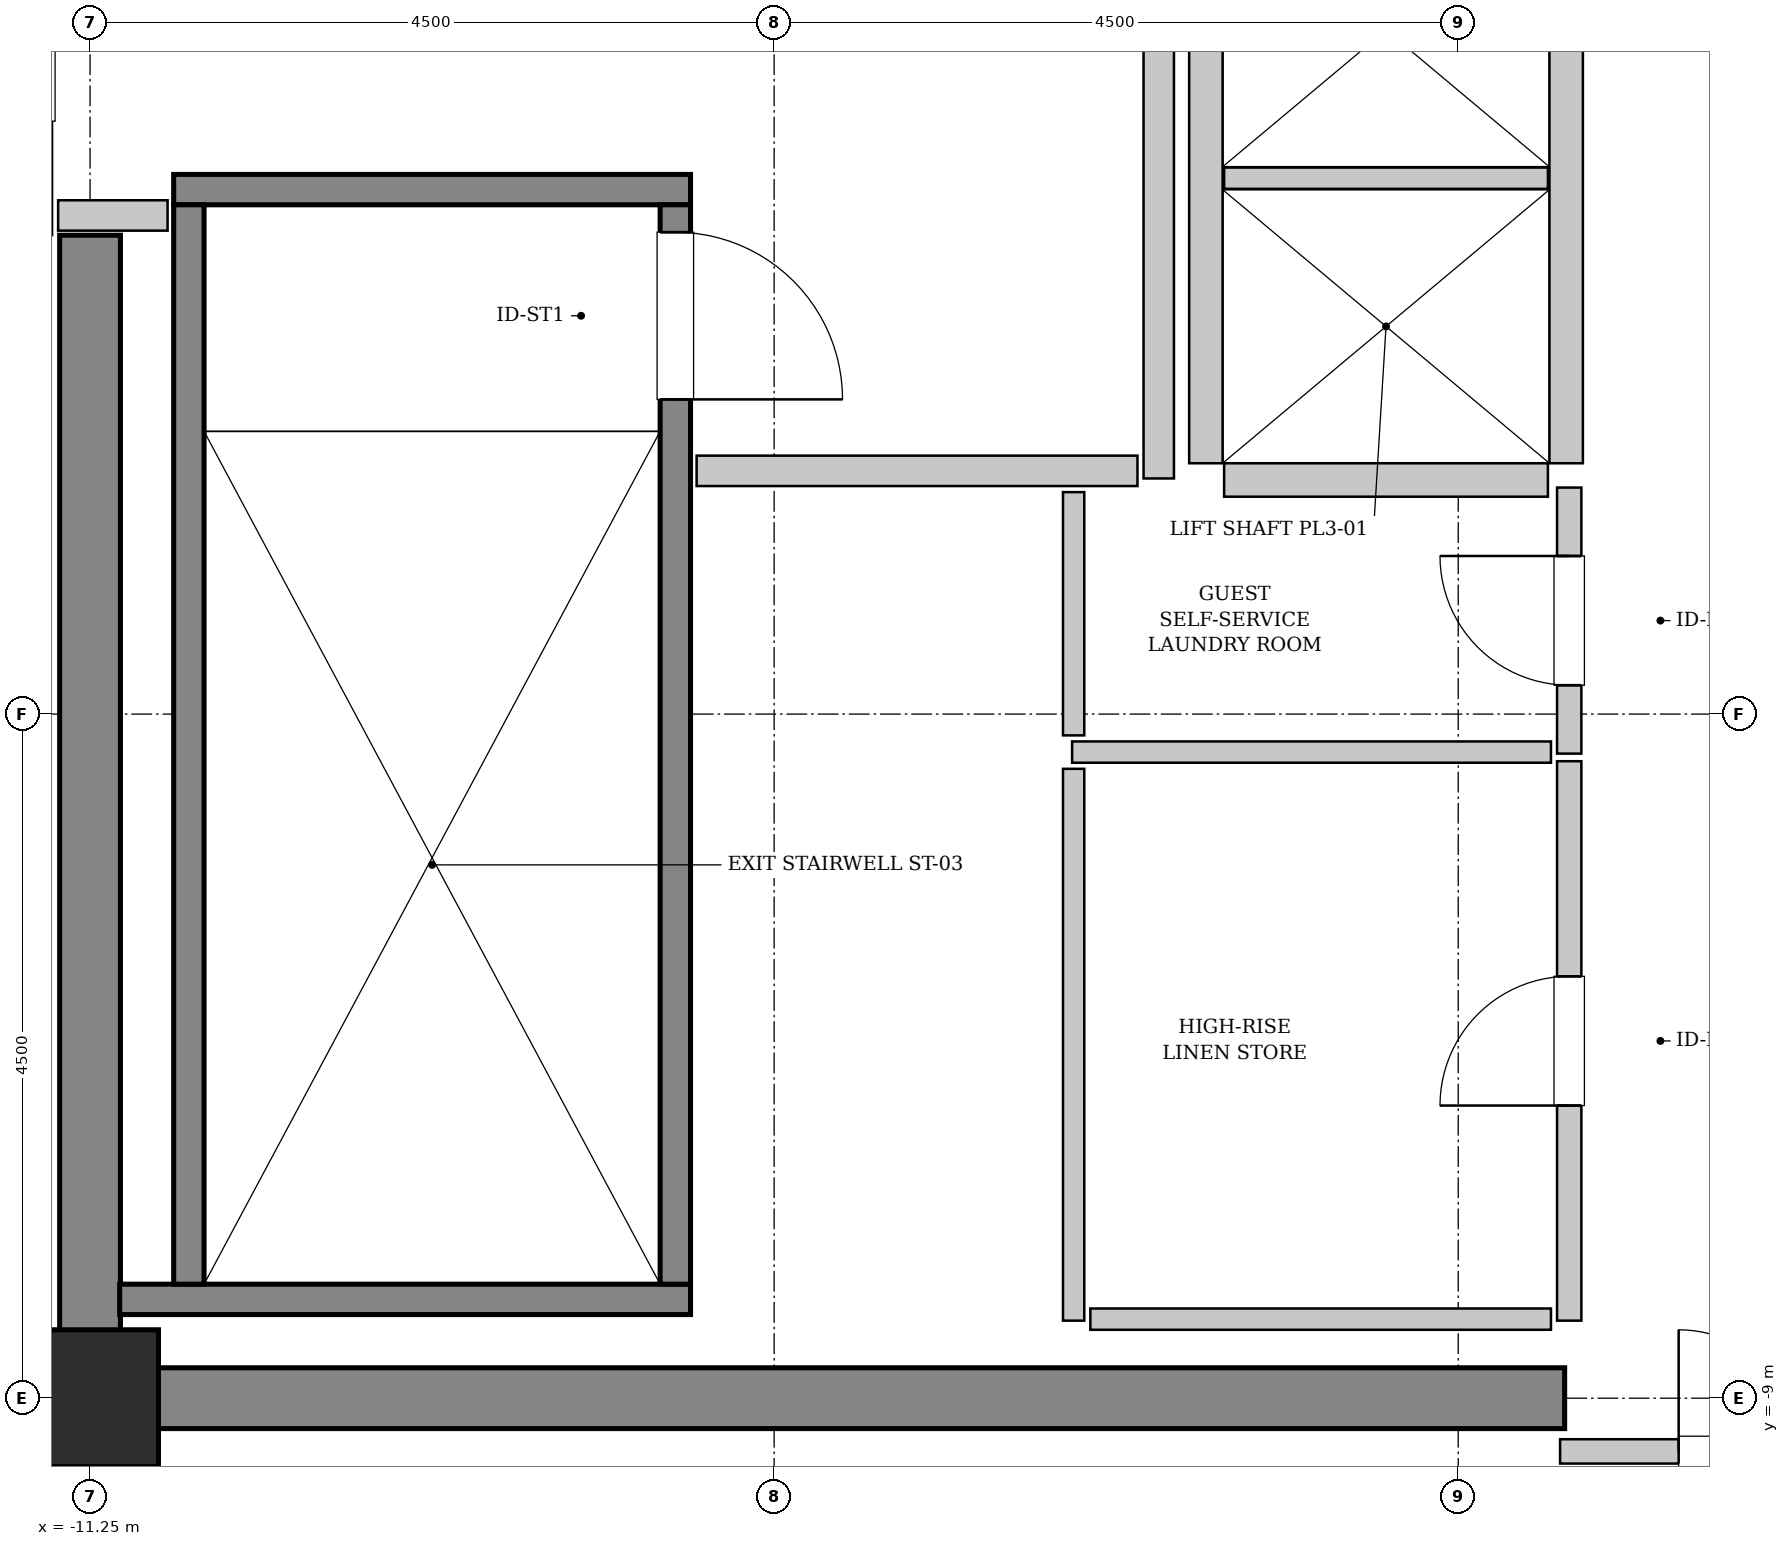
"""IFC4 building model, lengths in metres.
Left out: names, types, materials, properties, quantities, classifications, styles, units other than length and angle.
Written with IfcOpenShell. Run it as: python <this file> out.ifc"""

import sys

from ifc_helpers import new_model, si_unit, direction, frame, frame_2d, origin, origin_2d, place, context, subcontext, project, spatial, rectangle, extrude, source, transform, mapped, element, fill, save


model = new_model("IFC4")
c1 = context("Model", 3, precision=1e-05, world=origin(), true_north=direction((0.0, 1.0)))
c2 = subcontext(c1, "Body", "Model", "MODEL_VIEW")
j1 = project(units=[si_unit("LENGTHUNIT", "METRE"), si_unit("PLANEANGLEUNIT", "RADIAN")], contexts=[c1])
p1 = place(None, origin())
s1 = spatial("IfcSite", under=j1, at=p1, CompositionType="ELEMENT")
p2 = place(p1, origin())
s2 = spatial("IfcBuilding", under=s1, at=p2, CompositionType="ELEMENT")
p3 = place(p2, frame((0.0, 0.0, 349.0)))
s3 = spatial("IfcBuildingStorey", under=s2, at=p3, CompositionType="ELEMENT", Elevation=349.0)
m1 = source(origin(), c2, "Body", "SweptSolid", [
    extrude(rectangle(XDim=9.9, YDim=0.4, at=frame_2d((4.95, 0.0))), origin(), (0.0, 0.0, 1.0), 4.8),
])
p4 = place(p3, frame((-11.45, -9.0, 0.0), z_axis=(0.0, 0.0, 1.0), x_axis=(1.0, 0.0, 0.0)))
e1 = element("IfcWall", 1, at=p4, inside=s3, PredefinedType="SHEAR", context=c2, shape_type="MappedRepresentation", body=[
    mapped(m1, transform((0.0, 0.0, 0.0), x_axis=(1.0, 0.0, 0.0), y_axis=(0.0, 1.0, 0.0), z_axis=(0.0, 0.0, 1.0), scale=1.0)),
])
m2 = source(origin(), c2, "Body", "SweptSolid", [
    extrude(rectangle(XDim=7.45, YDim=0.4, at=frame_2d((3.725, 0.0))), origin(), (0.0, 0.0, 1.0), 4.8),
])
p5 = place(p3, frame((-11.25, -8.8, 0.0), z_axis=(0.0, 0.0, 1.0), x_axis=(0.0, 1.0, 0.0)))
e2 = element("IfcWall", 2, at=p5, inside=s3, PredefinedType="SHEAR", context=c2, shape_type="MappedRepresentation", body=[
    mapped(m2, transform((0.0, 0.0, 0.0), x_axis=(1.0, 0.0, 0.0), y_axis=(0.0, 1.0, 0.0), z_axis=(0.0, 0.0, 1.0), scale=1.0)),
])
m3 = source(origin(), c2, "Body", "SweptSolid", [
    extrude(rectangle(XDim=0.9, YDim=0.9, at=origin_2d()), origin(), (0.0, 0.0, 1.0), 4.8),
])
p6 = place(p3, frame((-11.25, -9.0, 0.0), z_axis=(0.0, 0.0, 1.0), x_axis=(1.0, 0.0, 0.0)))
e3 = element("IfcColumn", 3, at=p6, inside=s3, PredefinedType="COLUMN", context=c2, shape_type="MappedRepresentation", body=[
    mapped(m3, transform((0.0, 0.0, 0.0), x_axis=(1.0, 0.0, 0.0), y_axis=(0.0, 1.0, 0.0), z_axis=(0.0, 0.0, 1.0), scale=1.0)),
])
m4 = source(origin(), c2, "Body", "SweptSolid", [
    extrude(rectangle(XDim=3.4, YDim=0.2, at=frame_2d((1.7, 0.0))), origin(), (0.0, 0.0, 1.0), 4.8),
])
p7 = place(p3, frame((-10.7, -1.05, 0.0), z_axis=(0.0, 0.0, 1.0), x_axis=(1.0, 0.0, 0.0)))
e4 = element("IfcWall", 4, at=p7, inside=s3, PredefinedType="SOLIDWALL", context=c2, shape_type="MappedRepresentation", body=[
    mapped(m4, transform((0.0, 0.0, 0.0), x_axis=(1.0, 0.0, 0.0), y_axis=(0.0, 1.0, 0.0), z_axis=(0.0, 0.0, 1.0), scale=1.0)),
])
m5 = source(origin(), c2, "Body", "SweptSolid", [
    extrude(rectangle(XDim=3.755, YDim=0.2, at=frame_2d((1.877, 0.0))), origin(), (0.0, 0.0, 1.0), 4.8),
])
p8 = place(p3, frame((-11.055, -8.35, 0.0), z_axis=(0.0, 0.0, 1.0), x_axis=(1.0, 0.0, 0.0)))
e5 = element("IfcWall", 5, at=p8, inside=s3, PredefinedType="SOLIDWALL", context=c2, shape_type="MappedRepresentation", body=[
    mapped(m5, transform((0.0, 0.0, 0.0), x_axis=(1.0, 0.0, 0.0), y_axis=(0.0, 1.0, 0.0), z_axis=(0.0, 0.0, 1.0), scale=1.0)),
])
m6 = source(origin(), c2, "Body", "SweptSolid", [
    extrude(rectangle(XDim=7.1, YDim=0.2, at=frame_2d((3.55, 0.0))), origin(), (0.0, 0.0, 1.0), 4.8),
])
p9 = place(p3, frame((-10.6, -1.15, 0.0), z_axis=(0.0, 0.0, 1.0), x_axis=(0.0, -1.0, 0.0)))
e6 = element("IfcWall", 6, at=p9, inside=s3, PredefinedType="SOLIDWALL", context=c2, shape_type="MappedRepresentation", body=[
    mapped(m6, transform((0.0, 0.0, 0.0), x_axis=(1.0, 0.0, 0.0), y_axis=(0.0, 1.0, 0.0), z_axis=(0.0, 0.0, 1.0), scale=1.0)),
])
p10 = place(p3, frame((-7.4, -1.15, 0.0), z_axis=(0.0, 0.0, 1.0), x_axis=(0.0, -1.0, 0.0)))
e7 = element("IfcWall", 7, at=p10, inside=s3, PredefinedType="SOLIDWALL", context=c2, shape_type="MappedRepresentation", body=[
    mapped(m6, transform((0.0, 0.0, 0.0), x_axis=(1.0, 0.0, 0.0), y_axis=(0.0, 1.0, 0.0), z_axis=(0.0, 0.0, 1.0), scale=1.0)),
])
p11 = place(p10, frame((0.18, 0.0, 0.0)))
e8 = element("IfcOpeningElement", 8, at=p11, cuts=e7, PredefinedType="OPENING", context=c2, shape_type="SweptSolid", body=[
    extrude(rectangle(XDim=1.1, YDim=2.15, at=frame_2d((0.55, 1.075))), frame((0.0, 0.11, 0.0), z_axis=(0.0, -1.0, 0.0), x_axis=(1.0, 0.0, 0.0)), (0.0, 0.0, 1.0), 0.22),
])
m7 = source(origin(), c2, "Body", "SweptSolid", [
    extrude(rectangle(XDim=5.7, YDim=0.22, at=frame_2d((2.85, 0.0))), origin(), (0.0, 0.0, 1.0), 4.485),
])
for number, where, z_axis, x_axis in (
    (9, (-1.54, -2.85, 0.0), (0.0, 0.0, 1.0), (0.0, 1.0, 0.0)),
    (10, (-3.91, 2.85, 0.0), (0.0, 0.0, 1.0), (0.0, -1.0, 0.0)),
):
    element("IfcWall", number, at=place(p3, frame(where, z_axis=z_axis, x_axis=x_axis)), inside=s3, PredefinedType="SOLIDWALL", context=c2, shape_type="MappedRepresentation", body=[
        mapped(m7, transform((0.0, 0.0, 0.0), x_axis=(1.0, 0.0, 0.0), y_axis=(0.0, 1.0, 0.0), z_axis=(0.0, 0.0, 1.0), scale=1.0)),
    ])
m8 = source(origin(), c2, "Body", "SweptSolid", [
    extrude(rectangle(XDim=2.13, YDim=0.22, at=frame_2d((1.065, 0.0))), origin(), (0.0, 0.0, 1.0), 4.485),
])
p12 = place(p3, frame((-3.79, -2.96, 0.0), z_axis=(0.0, 0.0, 1.0), x_axis=(1.0, 0.0, 0.0)))
e11 = element("IfcWall", 11, at=p12, inside=s3, PredefinedType="SOLIDWALL", context=c2, shape_type="MappedRepresentation", body=[
    mapped(m8, transform((0.0, 0.0, 0.0), x_axis=(1.0, 0.0, 0.0), y_axis=(0.0, 1.0, 0.0), z_axis=(0.0, 0.0, 1.0), scale=1.0)),
])
m9 = source(origin(), c2, "Body", "SweptSolid", [
    extrude(rectangle(XDim=2.13, YDim=0.14, at=frame_2d((1.065, 0.0))), origin(), (0.0, 0.0, 1.0), 4.485),
])
p13 = place(p3, frame((-3.79, -0.975, 0.0), z_axis=(0.0, 0.0, 1.0), x_axis=(1.0, 0.0, 0.0)))
e12 = element("IfcWall", 12, at=p13, inside=s3, PredefinedType="PARTITIONING", context=c2, shape_type="MappedRepresentation", body=[
    mapped(m9, transform((0.0, 0.0, 0.0), x_axis=(1.0, 0.0, 0.0), y_axis=(0.0, 1.0, 0.0), z_axis=(0.0, 0.0, 1.0), scale=1.0)),
])
m10 = source(origin(), c2, "Body", "SweptSolid", [
    extrude(rectangle(XDim=5.9, YDim=0.2, at=frame_2d((2.95, 0.0))), origin(), (0.0, 0.0, 1.0), 4.485),
])
p14 = place(p3, frame((-4.22, -2.95, 0.0), z_axis=(0.0, 0.0, 1.0), x_axis=(0.0, 1.0, 0.0)))
e13 = element("IfcWall", 13, at=p14, inside=s3, PredefinedType="PARTITIONING", context=c2, shape_type="MappedRepresentation", body=[
    mapped(m10, transform((0.0, 0.0, 0.0), x_axis=(1.0, 0.0, 0.0), y_axis=(0.0, 1.0, 0.0), z_axis=(0.0, 0.0, 1.0), scale=1.0)),
])
m11 = source(origin(), c2, "Body", "SweptSolid", [
    extrude(rectangle(XDim=2.9, YDim=0.2, at=frame_2d((1.45, 0.0))), origin(), (0.0, 0.0, 1.0), 4.485),
])
p15 = place(p3, frame((-7.26, -2.9, 0.0), z_axis=(0.0, 0.0, 1.0), x_axis=(1.0, 0.0, 0.0)))
e14 = element("IfcWall", 14, at=p15, inside=s3, PredefinedType="PARTITIONING", context=c2, shape_type="MappedRepresentation", body=[
    mapped(m11, transform((0.0, 0.0, 0.0), x_axis=(1.0, 0.0, 0.0), y_axis=(0.0, 1.0, 0.0), z_axis=(0.0, 0.0, 1.0), scale=1.0)),
])
m12 = source(origin(), c2, "Body", "SweptSolid", [
    extrude(rectangle(XDim=0.72, YDim=0.2, at=frame_2d((0.36, 0.0))), origin(), (0.0, 0.0, 1.0), 4.485),
])
p16 = place(p3, frame((-11.46, -1.22, 0.0), z_axis=(0.0, 0.0, 1.0), x_axis=(1.0, 0.0, 0.0)))
e15 = element("IfcWall", 15, at=p16, inside=s3, PredefinedType="PARTITIONING", context=c2, shape_type="MappedRepresentation", body=[
    mapped(m12, transform((0.0, 0.0, 0.0), x_axis=(1.0, 0.0, 0.0), y_axis=(0.0, 1.0, 0.0), z_axis=(0.0, 0.0, 1.0), scale=1.0)),
])
m13 = source(origin(), c2, "Body", "SweptSolid", [
    extrude(rectangle(XDim=3.16, YDim=0.16, at=frame_2d((1.58, 0.0))), origin(), (0.0, 0.0, 1.0), 3.575),
])
p17 = place(p3, frame((-1.58, -9.35, 0.0), z_axis=(0.0, 0.0, 1.0), x_axis=(1.0, 0.0, 0.0)))
e16 = element("IfcWall", 16, at=p17, inside=s3, PredefinedType="PARTITIONING", context=c2, shape_type="MappedRepresentation", body=[
    mapped(m13, transform((0.0, 0.0, 0.0), x_axis=(1.0, 0.0, 0.0), y_axis=(0.0, 1.0, 0.0), z_axis=(0.0, 0.0, 1.0), scale=1.0)),
])
p18 = place(p17, frame((0.78, 0.0, 0.0)))
e17 = element("IfcOpeningElement", 17, at=p18, cuts=e16, PredefinedType="OPENING", context=c2, shape_type="SweptSolid", body=[
    extrude(rectangle(XDim=1.6, YDim=2.3, at=frame_2d((0.8, 1.15))), frame((0.0, 0.09, 0.0), z_axis=(0.0, -1.0, 0.0), x_axis=(1.0, 0.0, 0.0)), (0.0, 0.0, 1.0), 0.18),
])
m14 = source(origin(), c2, "Body", "SweptSolid", [
    extrude(rectangle(XDim=1.75, YDim=0.16, at=frame_2d((0.875, 0.0))), origin(), (0.0, 0.0, 1.0), 4.485),
])
p19 = place(p3, frame((-1.52, -4.76, 0.0), z_axis=(0.0, 0.0, 1.0), x_axis=(0.0, 1.0, 0.0)))
e18 = element("IfcWall", 18, at=p19, inside=s3, PredefinedType="PARTITIONING", context=c2, shape_type="MappedRepresentation", body=[
    mapped(m14, transform((0.0, 0.0, 0.0), x_axis=(1.0, 0.0, 0.0), y_axis=(0.0, 1.0, 0.0), z_axis=(0.0, 0.0, 1.0), scale=1.0)),
])
p20 = place(p19, frame((0.45, 0.0, 0.0)))
e19 = element("IfcOpeningElement", 19, at=p20, cuts=e18, PredefinedType="OPENING", context=c2, shape_type="SweptSolid", body=[
    extrude(rectangle(XDim=0.85, YDim=2.1, at=frame_2d((0.425, 1.05))), frame((0.0, 0.09, 0.0), z_axis=(0.0, -1.0, 0.0), x_axis=(1.0, 0.0, 0.0)), (0.0, 0.0, 1.0), 0.18),
])
m15 = source(origin(), c2, "Body", "SweptSolid", [
    extrude(rectangle(XDim=3.15, YDim=0.14, at=frame_2d((1.575, 0.0))), origin(), (0.0, 0.0, 1.0), 4.485),
])
p21 = place(p3, frame((-4.79, -4.75, 0.0), z_axis=(0.0, 0.0, 1.0), x_axis=(1.0, 0.0, 0.0)))
e20 = element("IfcWall", 20, at=p21, inside=s3, PredefinedType="PARTITIONING", context=c2, shape_type="MappedRepresentation", body=[
    mapped(m15, transform((0.0, 0.0, 0.0), x_axis=(1.0, 0.0, 0.0), y_axis=(0.0, 1.0, 0.0), z_axis=(0.0, 0.0, 1.0), scale=1.0)),
])
m16 = source(origin(), c2, "Body", "SweptSolid", [
    extrude(rectangle(XDim=1.6, YDim=0.14, at=frame_2d((0.8, 0.0))), origin(), (0.0, 0.0, 1.0), 4.485),
])
p22 = place(p3, frame((-4.78, -4.64, 0.0), z_axis=(0.0, 0.0, 1.0), x_axis=(0.0, 1.0, 0.0)))
e21 = element("IfcWall", 21, at=p22, inside=s3, PredefinedType="PARTITIONING", context=c2, shape_type="MappedRepresentation", body=[
    mapped(m16, transform((0.0, 0.0, 0.0), x_axis=(1.0, 0.0, 0.0), y_axis=(0.0, 1.0, 0.0), z_axis=(0.0, 0.0, 1.0), scale=1.0)),
])
m17 = source(origin(), c2, "Body", "SweptSolid", [
    extrude(rectangle(XDim=3.68, YDim=0.16, at=frame_2d((1.84, 0.0))), origin(), (0.0, 0.0, 1.0), 4.485),
])
p23 = place(p3, frame((-1.52, -8.49, 0.0), z_axis=(0.0, 0.0, 1.0), x_axis=(0.0, 1.0, 0.0)))
e22 = element("IfcWall", 22, at=p23, inside=s3, PredefinedType="PARTITIONING", context=c2, shape_type="MappedRepresentation", body=[
    mapped(m17, transform((0.0, 0.0, 0.0), x_axis=(1.0, 0.0, 0.0), y_axis=(0.0, 1.0, 0.0), z_axis=(0.0, 0.0, 1.0), scale=1.0)),
])
p24 = place(p23, frame((1.415, 0.0, 0.0)))
e23 = element("IfcOpeningElement", 23, at=p24, cuts=e22, PredefinedType="OPENING", context=c2, shape_type="SweptSolid", body=[
    extrude(rectangle(XDim=0.85, YDim=2.1, at=frame_2d((0.425, 1.05))), frame((0.0, 0.09, 0.0), z_axis=(0.0, -1.0, 0.0), x_axis=(1.0, 0.0, 0.0)), (0.0, 0.0, 1.0), 0.18),
])
m18 = source(origin(), c2, "Body", "SweptSolid", [
    extrude(rectangle(XDim=3.63, YDim=0.14, at=frame_2d((1.815, 0.0))), origin(), (0.0, 0.0, 1.0), 4.485),
])
p25 = place(p3, frame((-4.78, -8.49, 0.0), z_axis=(0.0, 0.0, 1.0), x_axis=(0.0, 1.0, 0.0)))
e24 = element("IfcWall", 24, at=p25, inside=s3, PredefinedType="PARTITIONING", context=c2, shape_type="MappedRepresentation", body=[
    mapped(m18, transform((0.0, 0.0, 0.0), x_axis=(1.0, 0.0, 0.0), y_axis=(0.0, 1.0, 0.0), z_axis=(0.0, 0.0, 1.0), scale=1.0)),
])
m19 = source(origin(), c2, "Body", "SweptSolid", [
    extrude(rectangle(XDim=3.03, YDim=0.14, at=frame_2d((1.515, 0.0))), origin(), (0.0, 0.0, 1.0), 4.485),
])
p26 = place(p3, frame((-4.67, -8.48, 0.0), z_axis=(0.0, 0.0, 1.0), x_axis=(1.0, 0.0, 0.0)))
e25 = element("IfcWall", 25, at=p26, inside=s3, PredefinedType="PARTITIONING", context=c2, shape_type="MappedRepresentation", body=[
    mapped(m19, transform((0.0, 0.0, 0.0), x_axis=(1.0, 0.0, 0.0), y_axis=(0.0, 1.0, 0.0), z_axis=(0.0, 0.0, 1.0), scale=1.0)),
])
m20 = source(origin(), c2, "Body", "SweptSolid", [
    extrude(rectangle(XDim=1.1, YDim=2.15, at=frame_2d((0.55, 1.075))), frame((0.0, 0.025, 0.0), z_axis=(0.0, -1.0, 0.0), x_axis=(1.0, 0.0, 0.0)), (0.0, 0.0, 1.0), 0.05),
])
p27 = place(p11, origin())
e26 = element("IfcDoor", 26, at=p27, inside=s3, OperationType="SINGLE_SWING_RIGHT", PredefinedType="DOOR", context=c2, shape_type="MappedRepresentation", body=[
    mapped(m20, transform((0.0, 0.0, 0.0), x_axis=(1.0, 0.0, 0.0), y_axis=(0.0, 1.0, 0.0), z_axis=(0.0, 0.0, 1.0), scale=1.0)),
])
fill(e8, e26)
m21 = source(origin(), c2, "Body", "SweptSolid", [
    extrude(rectangle(XDim=1.6, YDim=2.3, at=frame_2d((0.8, 1.15))), frame((0.0, 0.025, 0.0), z_axis=(0.0, -1.0, 0.0), x_axis=(1.0, 0.0, 0.0)), (0.0, 0.0, 1.0), 0.05),
])
p28 = place(p18, origin())
e27 = element("IfcDoor", 27, at=p28, inside=s3, OperationType="DOUBLE_DOOR_SINGLE_SWING", PredefinedType="DOOR", context=c2, shape_type="MappedRepresentation", body=[
    mapped(m21, transform((0.0, 0.0, 0.0), x_axis=(1.0, 0.0, 0.0), y_axis=(0.0, 1.0, 0.0), z_axis=(0.0, 0.0, 1.0), scale=1.0)),
])
fill(e17, e27)
m22 = source(origin(), c2, "Body", "SweptSolid", [
    extrude(rectangle(XDim=0.85, YDim=2.1, at=frame_2d((0.425, 1.05))), frame((0.0, 0.025, 0.0), z_axis=(0.0, -1.0, 0.0), x_axis=(1.0, 0.0, 0.0)), (0.0, 0.0, 1.0), 0.05),
])
p29 = place(p20, origin())
e28 = element("IfcDoor", 28, at=p29, inside=s3, OperationType="SINGLE_SWING_RIGHT", PredefinedType="DOOR", context=c2, shape_type="MappedRepresentation", body=[
    mapped(m22, transform((0.0, 0.0, 0.0), x_axis=(1.0, 0.0, 0.0), y_axis=(0.0, 1.0, 0.0), z_axis=(0.0, 0.0, 1.0), scale=1.0)),
])
fill(e19, e28)
p30 = place(p24, origin())
e29 = element("IfcDoor", 29, at=p30, inside=s3, OperationType="SINGLE_SWING_LEFT", PredefinedType="DOOR", context=c2, shape_type="MappedRepresentation", body=[
    mapped(m22, transform((0.0, 0.0, 0.0), x_axis=(1.0, 0.0, 0.0), y_axis=(0.0, 1.0, 0.0), z_axis=(0.0, 0.0, 1.0), scale=1.0)),
])
fill(e23, e29)
save(model, sys.argv[1])
